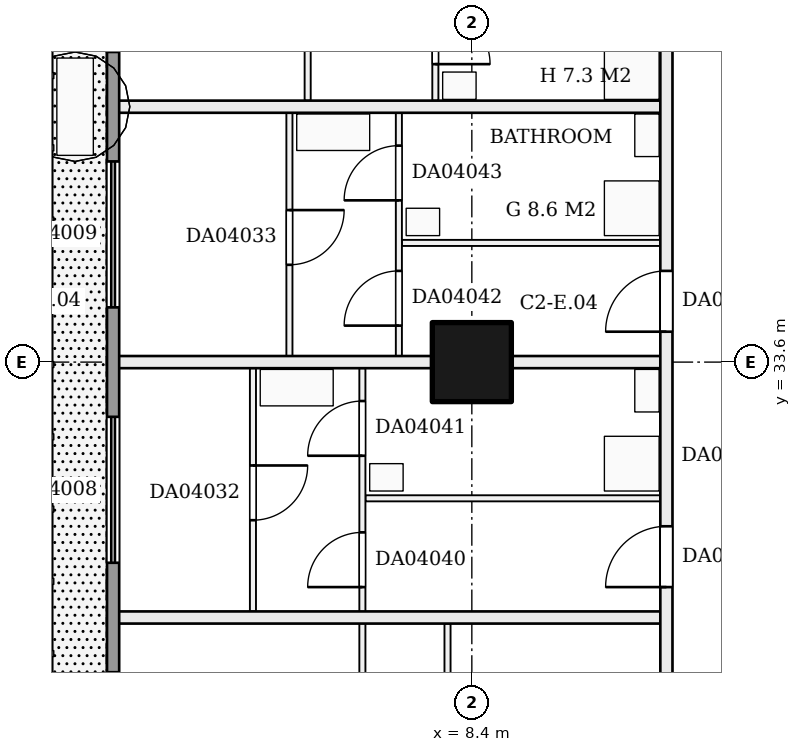
"""IFC4 building model, lengths in metres.
Left out: names, types, materials, properties, quantities, classifications, styles, units other than length and angle.
Written with IfcOpenShell. Run it as: python <this file> out.ifc"""

import sys

from ifc_helpers import new_model, si_unit, direction, frame, frame_2d, origin, origin_2d, place, context, subcontext, project, spatial, rectangle, extrude, element, fill, save


model = new_model("IFC4")
c1 = context("Model", 3, precision=1e-05, world=origin(), true_north=direction((0.0, 1.0)))
c2 = subcontext(c1, "Body", "Model", "MODEL_VIEW")
j1 = project(units=[si_unit("LENGTHUNIT", "METRE"), si_unit("PLANEANGLEUNIT", "RADIAN")], contexts=[c1])
p1 = place(None, origin())
s1 = spatial("IfcSite", under=j1, at=p1, CompositionType="ELEMENT")
p2 = place(p1, origin())
s2 = spatial("IfcBuilding", under=s1, at=p2, CompositionType="ELEMENT")
p3 = place(p2, frame((0.0, 0.0, 25.2)))
s3 = spatial("IfcBuildingStorey", under=s2, at=p3, CompositionType="ELEMENT", Elevation=25.2)
p4 = place(p3, frame((8.4, 33.6, 0.0), z_axis=(0.0, 0.0, 1.0), x_axis=(1.0, 0.0, 0.0)))
e1 = element("IfcColumn", 1, at=p4, inside=s3, PredefinedType="COLUMN", context=c2, shape_type="SweptSolid", body=[
    extrude(rectangle(XDim=1.3, YDim=1.3, at=origin_2d()), origin(), (0.0, 0.0, 1.0), 3.22),
])
p5 = place(p3, frame((2.5, 29.4, 0.0), z_axis=(0.0, 0.0, 1.0), x_axis=(1.0, 0.0, 0.0)))
e2 = element("IfcWall", 2, at=p5, inside=s3, PredefinedType="PARTITIONING", context=c2, shape_type="SweptSolid", body=[
    extrude(rectangle(XDim=9.0, YDim=0.2, at=frame_2d((4.5, 0.0))), origin(), (0.0, 0.0, 1.0), 3.22),
])
p6 = place(p3, frame((6.65, 31.36, 0.0), z_axis=(0.0, 0.0, 1.0), x_axis=(1.0, 0.0, 0.0)))
e3 = element("IfcWall", 3, at=p6, inside=s3, PredefinedType="PARTITIONING", context=c2, shape_type="SweptSolid", body=[
    extrude(rectangle(XDim=4.85, YDim=0.1, at=frame_2d((2.425, 0.0))), origin(), (0.0, 0.0, 1.0), 3.22),
])
p7 = place(p3, frame((2.5, 33.6, 0.0), z_axis=(0.0, 0.0, 1.0), x_axis=(1.0, 0.0, 0.0)))
e4 = element("IfcWall", 4, at=p7, inside=s3, PredefinedType="PARTITIONING", context=c2, shape_type="SweptSolid", body=[
    extrude(rectangle(XDim=9.0, YDim=0.2, at=frame_2d((4.5, 0.0))), origin(), (0.0, 0.0, 1.0), 3.22),
])
p8 = place(p3, frame((7.25, 35.56, 0.0), z_axis=(0.0, 0.0, 1.0), x_axis=(1.0, 0.0, 0.0)))
e5 = element("IfcWall", 5, at=p8, inside=s3, PredefinedType="PARTITIONING", context=c2, shape_type="SweptSolid", body=[
    extrude(rectangle(XDim=4.25, YDim=0.1, at=frame_2d((2.125, 0.0))), origin(), (0.0, 0.0, 1.0), 3.22),
])
p9 = place(p3, frame((2.5, 37.8, 0.0), z_axis=(0.0, 0.0, 1.0), x_axis=(1.0, 0.0, 0.0)))
e6 = element("IfcWall", 6, at=p9, inside=s3, PredefinedType="PARTITIONING", context=c2, shape_type="SweptSolid", body=[
    extrude(rectangle(XDim=9.0, YDim=0.2, at=frame_2d((4.5, 0.0))), origin(), (0.0, 0.0, 1.0), 3.22),
])
p10 = place(p3, frame((4.8, 29.5, 0.0), z_axis=(0.0, 0.0, 1.0), x_axis=(0.0, 1.0, 0.0)))
e7 = element("IfcWall", 7, at=p10, inside=s3, PredefinedType="PARTITIONING", context=c2, shape_type="SweptSolid", body=[
    extrude(rectangle(XDim=4.0, YDim=0.1, at=frame_2d((2.0, 0.0))), origin(), (0.0, 0.0, 1.0), 3.22),
])
p11 = place(p10, frame((1.5, 0.0, 0.0)))
e8 = element("IfcOpeningElement", 8, at=p11, cuts=e7, PredefinedType="OPENING", context=c2, shape_type="SweptSolid", body=[
    extrude(rectangle(XDim=0.9, YDim=2.1, at=frame_2d((0.45, 1.05))), frame((0.0, 0.06, 0.0), z_axis=(0.0, -1.0, 0.0), x_axis=(1.0, 0.0, 0.0)), (0.0, 0.0, 1.0), 0.12),
])
p12 = place(p3, frame((5.4, 33.7, 0.0), z_axis=(0.0, 0.0, 1.0), x_axis=(0.0, 1.0, 0.0)))
e9 = element("IfcWall", 9, at=p12, inside=s3, PredefinedType="PARTITIONING", context=c2, shape_type="SweptSolid", body=[
    extrude(rectangle(XDim=4.0, YDim=0.1, at=frame_2d((2.0, 0.0))), origin(), (0.0, 0.0, 1.0), 3.22),
])
p13 = place(p12, frame((1.5, 0.0, 0.0)))
e10 = element("IfcOpeningElement", 10, at=p13, cuts=e9, PredefinedType="OPENING", context=c2, shape_type="SweptSolid", body=[
    extrude(rectangle(XDim=0.9, YDim=2.1, at=frame_2d((0.45, 1.05))), frame((0.0, 0.06, 0.0), z_axis=(0.0, -1.0, 0.0), x_axis=(1.0, 0.0, 0.0)), (0.0, 0.0, 1.0), 0.12),
])
p14 = place(p3, frame((5.7, 37.9, 0.0), z_axis=(0.0, 0.0, 1.0), x_axis=(0.0, 1.0, 0.0)))
e11 = element("IfcWall", 11, at=p14, inside=s3, PredefinedType="PARTITIONING", context=c2, shape_type="SweptSolid", body=[
    extrude(rectangle(XDim=4.0, YDim=0.1, at=frame_2d((2.0, 0.0))), origin(), (0.0, 0.0, 1.0), 3.22),
])
p15 = place(p14, frame((1.5, 0.0, 0.0)))
e12 = element("IfcOpeningElement", 12, at=p15, cuts=e11, PredefinedType="OPENING", context=c2, shape_type="SweptSolid", body=[
    extrude(rectangle(XDim=0.9, YDim=2.1, at=frame_2d((0.45, 1.05))), frame((0.0, 0.06, 0.0), z_axis=(0.0, -1.0, 0.0), x_axis=(1.0, 0.0, 0.0)), (0.0, 0.0, 1.0), 0.12),
])
p16 = place(p3, frame((6.6, 12.7, 0.0), z_axis=(0.0, 0.0, 1.0), x_axis=(0.0, 1.0, 0.0)))
e13 = element("IfcWall", 13, at=p16, inside=s3, PredefinedType="PARTITIONING", context=c2, shape_type="SweptSolid", body=[
    extrude(rectangle(XDim=20.8, YDim=0.1, at=frame_2d((10.4, 0.0))), origin(), (0.0, 0.0, 1.0), 3.22),
])
p17 = place(p16, frame((5.7, 0.0, 0.0)))
e14 = element("IfcOpeningElement", 14, at=p17, cuts=e13, PredefinedType="OPENING", context=c2, shape_type="SweptSolid", body=[
    extrude(rectangle(XDim=0.9, YDim=2.1, at=frame_2d((0.45, 1.05))), frame((0.0, 0.06, 0.0), z_axis=(0.0, -1.0, 0.0), x_axis=(1.0, 0.0, 0.0)), (0.0, 0.0, 1.0), 0.12),
])
p18 = place(p16, frame((14.1, 0.0, 0.0)))
e15 = element("IfcOpeningElement", 15, at=p18, cuts=e13, PredefinedType="OPENING", context=c2, shape_type="SweptSolid", body=[
    extrude(rectangle(XDim=0.9, YDim=2.1, at=frame_2d((0.45, 1.05))), frame((0.0, 0.06, 0.0), z_axis=(0.0, -1.0, 0.0), x_axis=(1.0, 0.0, 0.0)), (0.0, 0.0, 1.0), 0.12),
])
p19 = place(p16, frame((17.2, 0.0, 0.0)))
e16 = element("IfcOpeningElement", 16, at=p19, cuts=e13, PredefinedType="OPENING", context=c2, shape_type="SweptSolid", body=[
    extrude(rectangle(XDim=0.9, YDim=2.1, at=frame_2d((0.45, 1.05))), frame((0.0, 0.06, 0.0), z_axis=(0.0, -1.0, 0.0), x_axis=(1.0, 0.0, 0.0)), (0.0, 0.0, 1.0), 0.12),
])
p20 = place(p16, frame((19.36, 0.0, 0.0)))
e17 = element("IfcOpeningElement", 17, at=p20, cuts=e13, PredefinedType="OPENING", context=c2, shape_type="SweptSolid", body=[
    extrude(rectangle(XDim=0.9, YDim=2.1, at=frame_2d((0.45, 1.05))), frame((0.0, 0.06, 0.0), z_axis=(0.0, -1.0, 0.0), x_axis=(1.0, 0.0, 0.0)), (0.0, 0.0, 1.0), 0.12),
])
p21 = place(p3, frame((7.2, 33.7, 0.0), z_axis=(0.0, 0.0, 1.0), x_axis=(0.0, 1.0, 0.0)))
e18 = element("IfcWall", 18, at=p21, inside=s3, PredefinedType="PARTITIONING", context=c2, shape_type="SweptSolid", body=[
    extrude(rectangle(XDim=4.0, YDim=0.1, at=frame_2d((2.0, 0.0))), origin(), (0.0, 0.0, 1.0), 3.22),
])
p22 = place(p21, frame((0.5, 0.0, 0.0)))
e19 = element("IfcOpeningElement", 19, at=p22, cuts=e18, PredefinedType="OPENING", context=c2, shape_type="SweptSolid", body=[
    extrude(rectangle(XDim=0.9, YDim=2.1, at=frame_2d((0.45, 1.05))), frame((0.0, 0.06, 0.0), z_axis=(0.0, -1.0, 0.0), x_axis=(1.0, 0.0, 0.0)), (0.0, 0.0, 1.0), 0.12),
])
p23 = place(p21, frame((2.56, 0.0, 0.0)))
e20 = element("IfcOpeningElement", 20, at=p23, cuts=e18, PredefinedType="OPENING", context=c2, shape_type="SweptSolid", body=[
    extrude(rectangle(XDim=0.9, YDim=2.1, at=frame_2d((0.45, 1.05))), frame((0.0, 0.06, 0.0), z_axis=(0.0, -1.0, 0.0), x_axis=(1.0, 0.0, 0.0)), (0.0, 0.0, 1.0), 0.12),
])
p24 = place(p3, frame((7.8, 37.9, 0.0), z_axis=(0.0, 0.0, 1.0), x_axis=(0.0, 1.0, 0.0)))
e21 = element("IfcWall", 21, at=p24, inside=s3, PredefinedType="PARTITIONING", context=c2, shape_type="SweptSolid", body=[
    extrude(rectangle(XDim=4.0, YDim=0.1, at=frame_2d((2.0, 0.0))), origin(), (0.0, 0.0, 1.0), 3.22),
])
p25 = place(p24, frame((2.64, 0.0, 0.0)))
e22 = element("IfcOpeningElement", 22, at=p25, cuts=e21, PredefinedType="OPENING", context=c2, shape_type="SweptSolid", body=[
    extrude(rectangle(XDim=0.9, YDim=2.1, at=frame_2d((0.45, 1.05))), frame((0.0, 0.06, 0.0), z_axis=(0.0, -1.0, 0.0), x_axis=(1.0, 0.0, 0.0)), (0.0, 0.0, 1.0), 0.12),
])
p26 = place(p24, frame((0.6, 0.0, 0.0)))
e23 = element("IfcOpeningElement", 23, at=p26, cuts=e21, PredefinedType="OPENING", context=c2, shape_type="SweptSolid", body=[
    extrude(rectangle(XDim=0.9, YDim=2.1, at=frame_2d((0.45, 1.05))), frame((0.0, 0.06, 0.0), z_axis=(0.0, -1.0, 0.0), x_axis=(1.0, 0.0, 0.0)), (0.0, 0.0, 1.0), 0.12),
])
p27 = place(p3, frame((8.0, 12.7, 0.0), z_axis=(0.0, 0.0, 1.0), x_axis=(0.0, 1.0, 0.0)))
e24 = element("IfcWall", 24, at=p27, inside=s3, PredefinedType="PARTITIONING", context=c2, shape_type="SweptSolid", body=[
    extrude(rectangle(XDim=16.6, YDim=0.1, at=frame_2d((8.3, 0.0))), origin(), (0.0, 0.0, 1.0), 3.22),
])
p28 = place(p27, frame((14.1, 0.0, 0.0)))
e25 = element("IfcOpeningElement", 25, at=p28, cuts=e24, PredefinedType="OPENING", context=c2, shape_type="SweptSolid", body=[
    extrude(rectangle(XDim=0.9, YDim=2.1, at=frame_2d((0.45, 1.05))), frame((0.0, 0.06, 0.0), z_axis=(0.0, -1.0, 0.0), x_axis=(1.0, 0.0, 0.0)), (0.0, 0.0, 1.0), 0.12),
])
p29 = place(p27, frame((1.2, 0.0, 0.0)))
e26 = element("IfcOpeningElement", 26, at=p29, cuts=e24, PredefinedType="OPENING", context=c2, shape_type="SweptSolid", body=[
    extrude(rectangle(XDim=0.9, YDim=2.1, at=frame_2d((0.45, 1.05))), frame((0.0, 0.06, 0.0), z_axis=(0.0, -1.0, 0.0), x_axis=(1.0, 0.0, 0.0)), (0.0, 0.0, 1.0), 0.12),
])
p30 = place(p27, frame((5.5, 0.0, 0.0)))
e27 = element("IfcOpeningElement", 27, at=p30, cuts=e24, PredefinedType="OPENING", context=c2, shape_type="SweptSolid", body=[
    extrude(rectangle(XDim=0.9, YDim=2.1, at=frame_2d((0.45, 1.05))), frame((0.0, 0.06, 0.0), z_axis=(0.0, -1.0, 0.0), x_axis=(1.0, 0.0, 0.0)), (0.0, 0.0, 1.0), 0.12),
])
p31 = place(p27, frame((10.0, 0.0, 0.0)))
e28 = element("IfcOpeningElement", 28, at=p31, cuts=e24, PredefinedType="OPENING", context=c2, shape_type="SweptSolid", body=[
    extrude(rectangle(XDim=0.9, YDim=2.1, at=frame_2d((0.45, 1.05))), frame((0.0, 0.06, 0.0), z_axis=(0.0, -1.0, 0.0), x_axis=(1.0, 0.0, 0.0)), (0.0, 0.0, 1.0), 0.12),
])
p32 = place(p3, frame((11.6, 11.7, 0.0), z_axis=(0.0, 0.0, 1.0), x_axis=(0.0, 1.0, 0.0)))
e29 = element("IfcWall", 29, at=p32, inside=s3, PredefinedType="PARTITIONING", context=c2, shape_type="SweptSolid", body=[
    extrude(rectangle(XDim=30.3, YDim=0.2, at=frame_2d((15.15, 0.0))), origin(), (0.0, 0.0, 1.0), 3.22),
])
p33 = place(p32, frame((15.0, 0.0, 0.0)))
e30 = element("IfcOpeningElement", 30, at=p33, cuts=e29, PredefinedType="OPENING", context=c2, shape_type="SweptSolid", body=[
    extrude(rectangle(XDim=1.0, YDim=2.1, at=frame_2d((0.5, 1.05))), frame((0.0, 0.11, 0.0), z_axis=(0.0, -1.0, 0.0), x_axis=(1.0, 0.0, 0.0)), (0.0, 0.0, 1.0), 0.22),
])
p34 = place(p32, frame((18.2, 0.0, 0.0)))
e31 = element("IfcOpeningElement", 31, at=p34, cuts=e29, PredefinedType="OPENING", context=c2, shape_type="SweptSolid", body=[
    extrude(rectangle(XDim=1.0, YDim=2.1, at=frame_2d((0.5, 1.05))), frame((0.0, 0.11, 0.0), z_axis=(0.0, -1.0, 0.0), x_axis=(1.0, 0.0, 0.0)), (0.0, 0.0, 1.0), 0.22),
])
p35 = place(p32, frame((22.4, 0.0, 0.0)))
e32 = element("IfcOpeningElement", 32, at=p35, cuts=e29, PredefinedType="OPENING", context=c2, shape_type="SweptSolid", body=[
    extrude(rectangle(XDim=1.0, YDim=2.1, at=frame_2d((0.5, 1.05))), frame((0.0, 0.11, 0.0), z_axis=(0.0, -1.0, 0.0), x_axis=(1.0, 0.0, 0.0)), (0.0, 0.0, 1.0), 0.22),
])
p36 = place(p32, frame((28.84, 0.0, 0.0)))
e33 = element("IfcOpeningElement", 33, at=p36, cuts=e29, PredefinedType="OPENING", context=c2, shape_type="SweptSolid", body=[
    extrude(rectangle(XDim=1.0, YDim=2.1, at=frame_2d((0.5, 1.05))), frame((0.0, 0.11, 0.0), z_axis=(0.0, -1.0, 0.0), x_axis=(1.0, 0.0, 0.0)), (0.0, 0.0, 1.0), 0.22),
])
p37 = place(p3, frame((2.5, 53.8, 0.0), z_axis=(0.0, 0.0, 1.0), x_axis=(0.0, -1.0, 0.0)))
e34 = element("IfcWall", 34, at=p37, inside=s3, PredefinedType="SOLIDWALL", context=c2, shape_type="SweptSolid", body=[
    extrude(rectangle(XDim=48.8, YDim=0.2, at=frame_2d((24.4, 0.0))), origin(), (0.0, 0.0, 1.0), 3.22),
])
p38 = place(p37, frame((46.1, 0.0, 0.0)))
e35 = element("IfcOpeningElement", 35, at=p38, cuts=e34, PredefinedType="OPENING", context=c2, shape_type="SweptSolid", body=[
    extrude(rectangle(XDim=2.4, YDim=2.2, at=frame_2d((1.2, 1.1))), frame((0.0, 0.11, 0.0), z_axis=(0.0, -1.0, 0.0), x_axis=(1.0, 0.0, 0.0)), (0.0, 0.0, 1.0), 0.22),
])
p39 = place(p37, frame((42.1, 0.0, 0.0)))
e36 = element("IfcOpeningElement", 36, at=p39, cuts=e34, PredefinedType="OPENING", context=c2, shape_type="SweptSolid", body=[
    extrude(rectangle(XDim=2.4, YDim=2.2, at=frame_2d((1.2, 1.1))), frame((0.0, 0.11, 0.0), z_axis=(0.0, -1.0, 0.0), x_axis=(1.0, 0.0, 0.0)), (0.0, 0.0, 1.0), 0.22),
])
p40 = place(p37, frame((37.9, 0.0, 0.0)))
e37 = element("IfcOpeningElement", 37, at=p40, cuts=e34, PredefinedType="OPENING", context=c2, shape_type="SweptSolid", body=[
    extrude(rectangle(XDim=2.4, YDim=2.2, at=frame_2d((1.2, 1.1))), frame((0.0, 0.11, 0.0), z_axis=(0.0, -1.0, 0.0), x_axis=(1.0, 0.0, 0.0)), (0.0, 0.0, 1.0), 0.22),
])
p41 = place(p37, frame((33.7, 0.0, 0.0)))
e38 = element("IfcOpeningElement", 38, at=p41, cuts=e34, PredefinedType="OPENING", context=c2, shape_type="SweptSolid", body=[
    extrude(rectangle(XDim=2.4, YDim=2.2, at=frame_2d((1.2, 1.1))), frame((0.0, 0.11, 0.0), z_axis=(0.0, -1.0, 0.0), x_axis=(1.0, 0.0, 0.0)), (0.0, 0.0, 1.0), 0.22),
])
p42 = place(p37, frame((29.5, 0.0, 0.0)))
e39 = element("IfcOpeningElement", 39, at=p42, cuts=e34, PredefinedType="OPENING", context=c2, shape_type="SweptSolid", body=[
    extrude(rectangle(XDim=2.4, YDim=2.2, at=frame_2d((1.2, 1.1))), frame((0.0, 0.11, 0.0), z_axis=(0.0, -1.0, 0.0), x_axis=(1.0, 0.0, 0.0)), (0.0, 0.0, 1.0), 0.22),
])
p43 = place(p37, frame((25.3, 0.0, 0.9)))
e40 = element("IfcOpeningElement", 40, at=p43, cuts=e34, PredefinedType="OPENING", context=c2, shape_type="SweptSolid", body=[
    extrude(rectangle(XDim=2.4, YDim=1.5, at=frame_2d((1.2, 0.75))), frame((0.0, 0.11, 0.0), z_axis=(0.0, -1.0, 0.0), x_axis=(1.0, 0.0, 0.0)), (0.0, 0.0, 1.0), 0.22),
])
p44 = place(p37, frame((21.1, 0.0, 0.0)))
e41 = element("IfcOpeningElement", 41, at=p44, cuts=e34, PredefinedType="OPENING", context=c2, shape_type="SweptSolid", body=[
    extrude(rectangle(XDim=2.4, YDim=2.2, at=frame_2d((1.2, 1.1))), frame((0.0, 0.11, 0.0), z_axis=(0.0, -1.0, 0.0), x_axis=(1.0, 0.0, 0.0)), (0.0, 0.0, 1.0), 0.22),
])
p45 = place(p37, frame((16.9, 0.0, 0.0)))
e42 = element("IfcOpeningElement", 42, at=p45, cuts=e34, PredefinedType="OPENING", context=c2, shape_type="SweptSolid", body=[
    extrude(rectangle(XDim=2.4, YDim=2.2, at=frame_2d((1.2, 1.1))), frame((0.0, 0.11, 0.0), z_axis=(0.0, -1.0, 0.0), x_axis=(1.0, 0.0, 0.0)), (0.0, 0.0, 1.0), 0.22),
])
p46 = place(p37, frame((12.7, 0.0, 0.0)))
e43 = element("IfcOpeningElement", 43, at=p46, cuts=e34, PredefinedType="OPENING", context=c2, shape_type="SweptSolid", body=[
    extrude(rectangle(XDim=2.4, YDim=2.2, at=frame_2d((1.2, 1.1))), frame((0.0, 0.11, 0.0), z_axis=(0.0, -1.0, 0.0), x_axis=(1.0, 0.0, 0.0)), (0.0, 0.0, 1.0), 0.22),
])
p47 = place(p37, frame((8.5, 0.0, 0.9)))
e44 = element("IfcOpeningElement", 44, at=p47, cuts=e34, PredefinedType="OPENING", context=c2, shape_type="SweptSolid", body=[
    extrude(rectangle(XDim=2.4, YDim=1.5, at=frame_2d((1.2, 0.75))), frame((0.0, 0.11, 0.0), z_axis=(0.0, -1.0, 0.0), x_axis=(1.0, 0.0, 0.0)), (0.0, 0.0, 1.0), 0.22),
])
p48 = place(p37, frame((4.3, 0.0, 0.9)))
e45 = element("IfcOpeningElement", 45, at=p48, cuts=e34, PredefinedType="OPENING", context=c2, shape_type="SweptSolid", body=[
    extrude(rectangle(XDim=2.4, YDim=1.5, at=frame_2d((1.2, 0.75))), frame((0.0, 0.11, 0.0), z_axis=(0.0, -1.0, 0.0), x_axis=(1.0, 0.0, 0.0)), (0.0, 0.0, 1.0), 0.22),
])
p49 = place(p37, frame((0.3, 0.0, 0.9)))
e46 = element("IfcOpeningElement", 46, at=p49, cuts=e34, PredefinedType="OPENING", context=c2, shape_type="SweptSolid", body=[
    extrude(rectangle(XDim=2.4, YDim=1.5, at=frame_2d((1.2, 0.75))), frame((0.0, 0.11, 0.0), z_axis=(0.0, -1.0, 0.0), x_axis=(1.0, 0.0, 0.0)), (0.0, 0.0, 1.0), 0.22),
])
p50 = place(p11, frame((0.9, 0.0, 0.0), z_axis=(0.0, 0.0, 1.0), x_axis=(-1.0, 0.0, 0.0)))
e47 = element("IfcDoor", 47, at=p50, inside=s3, OperationType="SINGLE_SWING_LEFT", PredefinedType="DOOR", context=c2, shape_type="SweptSolid", body=[
    extrude(rectangle(XDim=0.9, YDim=2.1, at=frame_2d((0.45, 1.05))), frame((0.0, 0.025, 0.0), z_axis=(0.0, -1.0, 0.0), x_axis=(1.0, 0.0, 0.0)), (0.0, 0.0, 1.0), 0.05),
])
fill(e8, e47)
p51 = place(p13, frame((0.9, 0.0, 0.0), z_axis=(0.0, 0.0, 1.0), x_axis=(-1.0, 0.0, 0.0)))
e48 = element("IfcDoor", 48, at=p51, inside=s3, OperationType="SINGLE_SWING_LEFT", PredefinedType="DOOR", context=c2, shape_type="SweptSolid", body=[
    extrude(rectangle(XDim=0.9, YDim=2.1, at=frame_2d((0.45, 1.05))), frame((0.0, 0.025, 0.0), z_axis=(0.0, -1.0, 0.0), x_axis=(1.0, 0.0, 0.0)), (0.0, 0.0, 1.0), 0.05),
])
fill(e10, e48)
p52 = place(p19, origin())
e49 = element("IfcDoor", 49, at=p52, inside=s3, OperationType="SINGLE_SWING_LEFT", PredefinedType="DOOR", context=c2, shape_type="SweptSolid", body=[
    extrude(rectangle(XDim=0.9, YDim=2.1, at=frame_2d((0.45, 1.05))), frame((0.0, 0.025, 0.0), z_axis=(0.0, -1.0, 0.0), x_axis=(1.0, 0.0, 0.0)), (0.0, 0.0, 1.0), 0.05),
])
fill(e16, e49)
p53 = place(p20, origin())
e50 = element("IfcDoor", 50, at=p53, inside=s3, OperationType="SINGLE_SWING_LEFT", PredefinedType="DOOR", context=c2, shape_type="SweptSolid", body=[
    extrude(rectangle(XDim=0.9, YDim=2.1, at=frame_2d((0.45, 1.05))), frame((0.0, 0.025, 0.0), z_axis=(0.0, -1.0, 0.0), x_axis=(1.0, 0.0, 0.0)), (0.0, 0.0, 1.0), 0.05),
])
fill(e17, e50)
p54 = place(p22, origin())
e51 = element("IfcDoor", 51, at=p54, inside=s3, OperationType="SINGLE_SWING_LEFT", PredefinedType="DOOR", context=c2, shape_type="SweptSolid", body=[
    extrude(rectangle(XDim=0.9, YDim=2.1, at=frame_2d((0.45, 1.05))), frame((0.0, 0.025, 0.0), z_axis=(0.0, -1.0, 0.0), x_axis=(1.0, 0.0, 0.0)), (0.0, 0.0, 1.0), 0.05),
])
fill(e19, e51)
p55 = place(p23, origin())
e52 = element("IfcDoor", 52, at=p55, inside=s3, OperationType="SINGLE_SWING_LEFT", PredefinedType="DOOR", context=c2, shape_type="SweptSolid", body=[
    extrude(rectangle(XDim=0.9, YDim=2.1, at=frame_2d((0.45, 1.05))), frame((0.0, 0.025, 0.0), z_axis=(0.0, -1.0, 0.0), x_axis=(1.0, 0.0, 0.0)), (0.0, 0.0, 1.0), 0.05),
])
fill(e20, e52)
p56 = place(p26, frame((0.9, 0.0, 0.0), z_axis=(0.0, 0.0, 1.0), x_axis=(-1.0, 0.0, 0.0)))
e53 = element("IfcDoor", 53, at=p56, inside=s3, OperationType="SINGLE_SWING_RIGHT", PredefinedType="DOOR", context=c2, shape_type="SweptSolid", body=[
    extrude(rectangle(XDim=0.9, YDim=2.1, at=frame_2d((0.45, 1.05))), frame((0.0, 0.025, 0.0), z_axis=(0.0, -1.0, 0.0), x_axis=(1.0, 0.0, 0.0)), (0.0, 0.0, 1.0), 0.05),
])
fill(e23, e53)
p57 = place(p34, origin())
e54 = element("IfcDoor", 54, at=p57, inside=s3, OperationType="SINGLE_SWING_LEFT", PredefinedType="DOOR", context=c2, shape_type="SweptSolid", body=[
    extrude(rectangle(XDim=1.0, YDim=2.1, at=frame_2d((0.5, 1.05))), frame((0.0, 0.025, 0.0), z_axis=(0.0, -1.0, 0.0), x_axis=(1.0, 0.0, 0.0)), (0.0, 0.0, 1.0), 0.05),
])
fill(e31, e54)
p58 = place(p35, origin())
e55 = element("IfcDoor", 55, at=p58, inside=s3, OperationType="SINGLE_SWING_LEFT", PredefinedType="DOOR", context=c2, shape_type="SweptSolid", body=[
    extrude(rectangle(XDim=1.0, YDim=2.1, at=frame_2d((0.5, 1.05))), frame((0.0, 0.025, 0.0), z_axis=(0.0, -1.0, 0.0), x_axis=(1.0, 0.0, 0.0)), (0.0, 0.0, 1.0), 0.05),
])
fill(e32, e55)
p59 = place(p44, origin())
e56 = element("IfcDoor", 56, at=p59, inside=s3, OperationType="DOUBLE_DOOR_SLIDING", PredefinedType="DOOR", context=c2, shape_type="SweptSolid", body=[
    extrude(rectangle(XDim=2.4, YDim=2.2, at=frame_2d((1.2, 1.1))), frame((0.0, 0.025, 0.0), z_axis=(0.0, -1.0, 0.0), x_axis=(1.0, 0.0, 0.0)), (0.0, 0.0, 1.0), 0.05),
])
fill(e41, e56)
p60 = place(p45, origin())
e57 = element("IfcDoor", 57, at=p60, inside=s3, OperationType="DOUBLE_DOOR_SLIDING", PredefinedType="DOOR", context=c2, shape_type="SweptSolid", body=[
    extrude(rectangle(XDim=2.4, YDim=2.2, at=frame_2d((1.2, 1.1))), frame((0.0, 0.025, 0.0), z_axis=(0.0, -1.0, 0.0), x_axis=(1.0, 0.0, 0.0)), (0.0, 0.0, 1.0), 0.05),
])
fill(e42, e57)
save(model, sys.argv[1])
